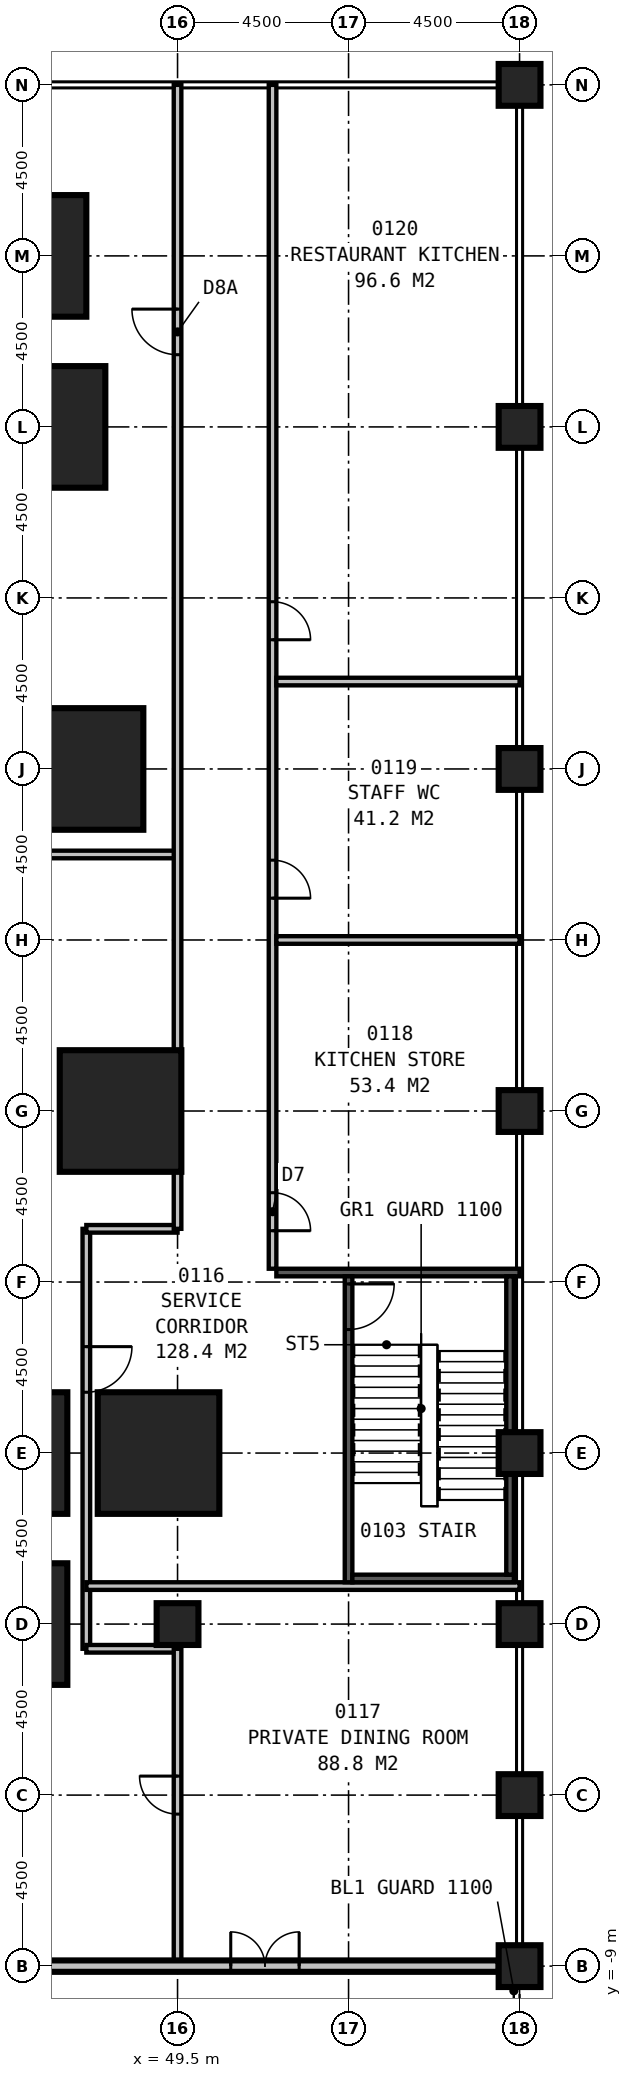
"""IFC4 building model, lengths in metres.
Left out: names, types, materials, properties, quantities, classifications, styles, units other than length and angle.
Written with IfcOpenShell. Run it as: python <this file> out.ifc"""

import sys

from ifc_helpers import new_model, si_unit, direction, frame, frame_2d, origin, origin_2d, place, context, subcontext, project, spatial, rectangle, extrude, element, fill, save


model = new_model("IFC4")
c1 = context("Model", 3, precision=1e-05, world=origin(), true_north=direction((0.0, 1.0)))
c2 = subcontext(c1, "Body", "Model", "MODEL_VIEW")
j1 = project(units=[si_unit("LENGTHUNIT", "METRE"), si_unit("PLANEANGLEUNIT", "RADIAN")], contexts=[c1])
p1 = place(None, origin())
s1 = spatial("IfcSite", under=j1, at=p1, CompositionType="ELEMENT")
p2 = place(p1, origin())
s2 = spatial("IfcBuilding", under=s1, at=p2, CompositionType="ELEMENT")
p3 = place(p2, frame((0.0, 0.0, 6.0)))
s3 = spatial("IfcBuildingStorey", under=s2, at=p3, CompositionType="ELEMENT", Elevation=6.0)
for number, where, z_axis, x_axis in (
    (1, (45.0, 0.0, 0.0), (0.0, 0.0, 1.0), (1.0, 0.0, 0.0)),
    (2, (45.0, 4.5, 0.0), (0.0, 0.0, 1.0), (1.0, 0.0, 0.0)),
    (3, (49.0, 4.5, 0.0), (0.0, 0.0, 1.0), (1.0, 0.0, 0.0)),
    (4, (48.0, 13.5, 0.0), (0.0, 0.0, 1.0), (1.0, 0.0, 0.0)),
    (5, (47.0, 22.5, 0.0), (0.0, 0.0, 1.0), (1.0, 0.0, 0.0)),
    (6, (46.0, 31.5, 0.0), (0.0, 0.0, 1.0), (1.0, 0.0, 0.0)),
    (7, (45.5, 36.0, 0.0), (0.0, 0.0, 1.0), (1.0, 0.0, 0.0)),
):
    element("IfcColumn", number, at=place(p3, frame(where, z_axis=z_axis, x_axis=x_axis)), inside=s3, PredefinedType="COLUMN", context=c2, shape_type="SweptSolid", body=[
        extrude(rectangle(XDim=3.2, YDim=3.2, at=origin_2d()), origin(), (0.0, 0.0, 1.0), 5.0),
    ])
for number, where, z_axis, x_axis in (
    (8, (58.5, -4.5, 0.0), (0.0, 0.0, 1.0), (1.0, 0.0, 0.0)),
    (9, (58.5, 4.5, 0.0), (0.0, 0.0, 1.0), (1.0, 0.0, 0.0)),
    (10, (58.5, 13.5, 0.0), (0.0, 0.0, 1.0), (1.0, 0.0, 0.0)),
    (11, (58.5, 22.5, 0.0), (0.0, 0.0, 1.0), (1.0, 0.0, 0.0)),
    (12, (58.5, 31.5, 0.0), (0.0, 0.0, 1.0), (1.0, 0.0, 0.0)),
    (13, (58.5, 40.5, 0.0), (0.0, 0.0, 1.0), (1.0, 0.0, 0.0)),
    (14, (58.5, 0.0, 0.0), (0.0, 0.0, 1.0), (1.0, 0.0, 0.0)),
    (15, (58.5, -9.0, 0.0), (0.0, 0.0, 1.0), (1.0, 0.0, 0.0)),
    (16, (49.5, 0.0, 0.0), (0.0, 0.0, 1.0), (1.0, 0.0, 0.0)),
):
    element("IfcColumn", number, at=place(p3, frame(where, z_axis=z_axis, x_axis=x_axis)), inside=s3, PredefinedType="COLUMN", context=c2, shape_type="SweptSolid", body=[
        extrude(rectangle(XDim=1.1, YDim=1.1, at=origin_2d()), origin(), (0.0, 0.0, 1.0), 5.0),
    ])
p4 = place(p3, frame((45.65, -9.0, 0.0), z_axis=(0.0, 0.0, 1.0), x_axis=(1.0, 0.0, 0.0)))
e17 = element("IfcWall", 17, at=p4, inside=s3, PredefinedType="STANDARD", context=c2, shape_type="SweptSolid", body=[
    extrude(rectangle(XDim=12.3, YDim=0.3, at=frame_2d((6.15, 0.0))), origin(), (0.0, 0.0, 1.0), 3.0),
])
p5 = place(p4, frame((5.25, 0.0, 0.0)))
e18 = element("IfcOpeningElement", 18, at=p5, cuts=e17, PredefinedType="OPENING", context=c2, shape_type="SweptSolid", body=[
    extrude(rectangle(XDim=1.8, YDim=2.4, at=frame_2d((0.9, 1.2))), frame((0.0, 0.16, 0.0), z_axis=(0.0, -1.0, 0.0), x_axis=(1.0, 0.0, 0.0)), (0.0, 0.0, 1.0), 0.32),
])
p6 = place(p3, frame((54.0, 1.1, 0.0), z_axis=(0.0, 0.0, 1.0), x_axis=(0.0, 1.0, 0.0)))
e19 = element("IfcWall", 19, at=p6, inside=s3, PredefinedType="SOLIDWALL", context=c2, shape_type="SweptSolid", body=[
    extrude(rectangle(XDim=8.05, YDim=0.2, at=frame_2d((4.025, 0.0))), origin(), (0.0, 0.0, 1.0), 4.7),
])
p7 = place(p6, frame((7.85, 0.0, 0.0), z_axis=(0.0, 0.0, 1.0), x_axis=(-1.0, 0.0, 0.0)))
e20 = element("IfcOpeningElement", 20, at=p7, cuts=e19, PredefinedType="OPENING", context=c2, shape_type="SweptSolid", body=[
    extrude(rectangle(XDim=1.2, YDim=2.1, at=frame_2d((0.6, 1.05))), frame((0.0, 0.11, 0.0), z_axis=(0.0, -1.0, 0.0), x_axis=(1.0, 0.0, 0.0)), (0.0, 0.0, 1.0), 0.22),
])
p8 = place(p3, frame((52.1, 9.25, 0.0), z_axis=(0.0, 0.0, 1.0), x_axis=(1.0, 0.0, 0.0)))
e21 = element("IfcWall", 21, at=p8, inside=s3, PredefinedType="SOLIDWALL", context=c2, shape_type="SweptSolid", body=[
    extrude(rectangle(XDim=6.4, YDim=0.2, at=frame_2d((3.2, 0.0))), origin(), (0.0, 0.0, 1.0), 4.7),
])
p9 = place(p3, frame((54.1, 1.2, 0.0), z_axis=(0.0, 0.0, 1.0), x_axis=(1.0, 0.0, 0.0)))
e22 = element("IfcWall", 22, at=p9, inside=s3, PredefinedType="SOLIDWALL", context=c2, shape_type="SweptSolid", body=[
    extrude(rectangle(XDim=4.25, YDim=0.2, at=frame_2d((2.125, 0.0))), origin(), (0.0, 0.0, 1.0), 4.7),
])
p10 = place(p3, frame((58.25, 1.3, 0.0), z_axis=(0.0, 0.0, 1.0), x_axis=(0.0, 1.0, 0.0)))
e23 = element("IfcWall", 23, at=p10, inside=s3, PredefinedType="SOLIDWALL", context=c2, shape_type="SweptSolid", body=[
    extrude(rectangle(XDim=2.65, YDim=0.2, at=frame_2d((1.325, 0.0))), origin(), (0.0, 0.0, 1.0), 4.7),
])
p11 = place(p3, frame((58.25, 5.05, 0.0), z_axis=(0.0, 0.0, 1.0), x_axis=(0.0, 1.0, 0.0)))
e24 = element("IfcWall", 24, at=p11, inside=s3, PredefinedType="SOLIDWALL", context=c2, shape_type="SweptSolid", body=[
    extrude(rectangle(XDim=4.1, YDim=0.2, at=frame_2d((2.05, 0.0))), origin(), (0.0, 0.0, 1.0), 4.7),
])
p12 = place(p3, frame((49.5, -9.0, 0.0), z_axis=(0.0, 0.0, 1.0), x_axis=(0.0, 1.0, 0.0)))
e25 = element("IfcWall", 25, at=p12, inside=s3, PredefinedType="PARTITIONING", context=c2, shape_type="SweptSolid", body=[
    extrude(rectangle(XDim=8.35, YDim=0.2, at=frame_2d((4.175, 0.0))), origin(), (0.0, 0.0, 1.0), 4.7),
])
p13 = place(p12, frame((4.0, 0.0, 0.0)))
e26 = element("IfcOpeningElement", 26, at=p13, cuts=e25, PredefinedType="OPENING", context=c2, shape_type="SweptSolid", body=[
    extrude(rectangle(XDim=1.0, YDim=2.1, at=frame_2d((0.5, 1.05))), frame((0.0, 0.11, 0.0), z_axis=(0.0, -1.0, 0.0), x_axis=(1.0, 0.0, 0.0)), (0.0, 0.0, 1.0), 0.22),
])
p14 = place(p3, frame((47.1, -0.65, 0.0), z_axis=(0.0, 0.0, 1.0), x_axis=(1.0, 0.0, 0.0)))
e27 = element("IfcWall", 27, at=p14, inside=s3, PredefinedType="PARTITIONING", context=c2, shape_type="SweptSolid", body=[
    extrude(rectangle(XDim=2.4, YDim=0.2, at=frame_2d((1.2, 0.0))), origin(), (0.0, 0.0, 1.0), 3.8),
])
p15 = place(p3, frame((47.1, -0.65, 0.0), z_axis=(0.0, 0.0, 1.0), x_axis=(0.0, 1.0, 0.0)))
e28 = element("IfcWall", 28, at=p15, inside=s3, PredefinedType="PARTITIONING", context=c2, shape_type="SweptSolid", body=[
    extrude(rectangle(XDim=11.05, YDim=0.2, at=frame_2d((5.525, 0.0))), origin(), (0.0, 0.0, 1.0), 4.7),
])
p16 = place(p15, frame((7.95, 0.0, 0.0), z_axis=(0.0, 0.0, 1.0), x_axis=(-1.0, 0.0, 0.0)))
e29 = element("IfcOpeningElement", 29, at=p16, cuts=e28, PredefinedType="OPENING", context=c2, shape_type="SweptSolid", body=[
    extrude(rectangle(XDim=1.2, YDim=2.1, at=frame_2d((0.6, 1.05))), frame((0.0, 0.11, 0.0), z_axis=(0.0, -1.0, 0.0), x_axis=(1.0, 0.0, 0.0)), (0.0, 0.0, 1.0), 0.22),
])
p17 = place(p3, frame((47.1, 10.4, 0.0), z_axis=(0.0, 0.0, 1.0), x_axis=(1.0, 0.0, 0.0)))
e30 = element("IfcWall", 30, at=p17, inside=s3, PredefinedType="PARTITIONING", context=c2, shape_type="SweptSolid", body=[
    extrude(rectangle(XDim=2.4, YDim=0.2, at=frame_2d((1.2, 0.0))), origin(), (0.0, 0.0, 1.0), 4.7),
])
p18 = place(p3, frame((49.5, 10.4, 0.0), z_axis=(0.0, 0.0, 1.0), x_axis=(0.0, 1.0, 0.0)))
e31 = element("IfcWall", 31, at=p18, inside=s3, PredefinedType="PARTITIONING", context=c2, shape_type="SweptSolid", body=[
    extrude(rectangle(XDim=30.1, YDim=0.2, at=frame_2d((15.05, 0.0))), origin(), (0.0, 0.0, 1.0), 4.7),
])
p19 = place(p18, frame((23.0, 0.0, 0.0)))
e32 = element("IfcOpeningElement", 32, at=p19, cuts=e31, PredefinedType="OPENING", context=c2, shape_type="SweptSolid", body=[
    extrude(rectangle(XDim=1.2, YDim=2.1, at=frame_2d((0.6, 1.05))), frame((0.0, 0.11, 0.0), z_axis=(0.0, -1.0, 0.0), x_axis=(1.0, 0.0, 0.0)), (0.0, 0.0, 1.0), 0.22),
])
p20 = place(p3, frame((36.3, 20.25, 0.0), z_axis=(0.0, 0.0, 1.0), x_axis=(1.0, 0.0, 0.0)))
e33 = element("IfcWall", 33, at=p20, inside=s3, PredefinedType="PARTITIONING", context=c2, shape_type="SweptSolid", body=[
    extrude(rectangle(XDim=13.2, YDim=0.2, at=frame_2d((6.6, 0.0))), origin(), (0.0, 0.0, 1.0), 4.7),
])
p21 = place(p20, frame((4.0, 0.0, 0.0)))
e34 = element("IfcOpeningElement", 34, at=p21, cuts=e33, PredefinedType="OPENING", context=c2, shape_type="SweptSolid", body=[
    extrude(rectangle(XDim=1.8, YDim=2.4, at=frame_2d((0.9, 1.2))), frame((0.0, 0.11, 0.0), z_axis=(0.0, -1.0, 0.0), x_axis=(1.0, 0.0, 0.0)), (0.0, 0.0, 1.0), 0.22),
])
p22 = place(p3, frame((52.0, 9.35, 0.0), z_axis=(0.0, 0.0, 1.0), x_axis=(0.0, 1.0, 0.0)))
e35 = element("IfcWall", 35, at=p22, inside=s3, PredefinedType="PARTITIONING", context=c2, shape_type="SweptSolid", body=[
    extrude(rectangle(XDim=31.15, YDim=0.2, at=frame_2d((15.575, 0.0))), origin(), (0.0, 0.0, 1.0), 4.7),
])
p23 = place(p22, frame((2.0, 0.0, 0.0), z_axis=(0.0, 0.0, 1.0), x_axis=(-1.0, 0.0, 0.0)))
e36 = element("IfcOpeningElement", 36, at=p23, cuts=e35, PredefinedType="OPENING", context=c2, shape_type="SweptSolid", body=[
    extrude(rectangle(XDim=1.0, YDim=2.1, at=frame_2d((0.5, 1.05))), frame((0.0, 0.11, 0.0), z_axis=(0.0, -1.0, 0.0), x_axis=(1.0, 0.0, 0.0)), (0.0, 0.0, 1.0), 0.22),
])
p24 = place(p22, frame((10.75, 0.0, 0.0), z_axis=(0.0, 0.0, 1.0), x_axis=(-1.0, 0.0, 0.0)))
e37 = element("IfcOpeningElement", 37, at=p24, cuts=e35, PredefinedType="OPENING", context=c2, shape_type="SweptSolid", body=[
    extrude(rectangle(XDim=1.0, YDim=2.1, at=frame_2d((0.5, 1.05))), frame((0.0, 0.11, 0.0), z_axis=(0.0, -1.0, 0.0), x_axis=(1.0, 0.0, 0.0)), (0.0, 0.0, 1.0), 0.22),
])
p25 = place(p22, frame((17.55, 0.0, 0.0), z_axis=(0.0, 0.0, 1.0), x_axis=(-1.0, 0.0, 0.0)))
e38 = element("IfcOpeningElement", 38, at=p25, cuts=e35, PredefinedType="OPENING", context=c2, shape_type="SweptSolid", body=[
    extrude(rectangle(XDim=1.0, YDim=2.1, at=frame_2d((0.5, 1.05))), frame((0.0, 0.11, 0.0), z_axis=(0.0, -1.0, 0.0), x_axis=(1.0, 0.0, 0.0)), (0.0, 0.0, 1.0), 0.22),
])
p26 = place(p3, frame((47.1, 1.0, 0.0), z_axis=(0.0, 0.0, 1.0), x_axis=(1.0, 0.0, 0.0)))
e39 = element("IfcWall", 39, at=p26, inside=s3, PredefinedType="PARTITIONING", context=c2, shape_type="SweptSolid", body=[
    extrude(rectangle(XDim=11.4, YDim=0.2, at=frame_2d((5.7, 0.0))), origin(), (0.0, 0.0, 1.0), 3.8),
])
for number, where, z_axis, x_axis in (
    (40, (52.1, 18.0, 0.0), (0.0, 0.0, 1.0), (1.0, 0.0, 0.0)),
    (41, (52.1, 24.8, 0.0), (0.0, 0.0, 1.0), (1.0, 0.0, 0.0)),
):
    element("IfcWall", number, at=place(p3, frame(where, z_axis=z_axis, x_axis=x_axis)), inside=s3, PredefinedType="PARTITIONING", context=c2, shape_type="SweptSolid", body=[
        extrude(rectangle(XDim=6.4, YDim=0.2, at=frame_2d((3.2, 0.0))), origin(), (0.0, 0.0, 1.0), 4.7),
    ])
p27 = place(p5, origin())
e42 = element("IfcDoor", 42, at=p27, inside=s3, OperationType="DOUBLE_DOOR_SINGLE_SWING", PredefinedType="DOOR", context=c2, shape_type="SweptSolid", body=[
    extrude(rectangle(XDim=1.8, YDim=2.4, at=frame_2d((0.9, 1.2))), frame((0.0, 0.025, 0.0), z_axis=(0.0, -1.0, 0.0), x_axis=(1.0, 0.0, 0.0)), (0.0, 0.0, 1.0), 0.05),
])
fill(e18, e42)
p28 = place(p7, origin())
e43 = element("IfcDoor", 43, at=p28, inside=s3, OperationType="SINGLE_SWING_LEFT", PredefinedType="DOOR", context=c2, shape_type="SweptSolid", body=[
    extrude(rectangle(XDim=1.2, YDim=2.1, at=frame_2d((0.6, 1.05))), frame((0.0, 0.025, 0.0), z_axis=(0.0, -1.0, 0.0), x_axis=(1.0, 0.0, 0.0)), (0.0, 0.0, 1.0), 0.05),
])
fill(e20, e43)
p29 = place(p13, origin())
e44 = element("IfcDoor", 44, at=p29, inside=s3, OperationType="SINGLE_SWING_RIGHT", PredefinedType="DOOR", context=c2, shape_type="SweptSolid", body=[
    extrude(rectangle(XDim=1.0, YDim=2.1, at=frame_2d((0.5, 1.05))), frame((0.0, 0.025, 0.0), z_axis=(0.0, -1.0, 0.0), x_axis=(1.0, 0.0, 0.0)), (0.0, 0.0, 1.0), 0.05),
])
fill(e26, e44)
p30 = place(p16, origin())
e45 = element("IfcDoor", 45, at=p30, inside=s3, OperationType="SINGLE_SWING_LEFT", PredefinedType="DOOR", context=c2, shape_type="SweptSolid", body=[
    extrude(rectangle(XDim=1.2, YDim=2.1, at=frame_2d((0.6, 1.05))), frame((0.0, 0.025, 0.0), z_axis=(0.0, -1.0, 0.0), x_axis=(1.0, 0.0, 0.0)), (0.0, 0.0, 1.0), 0.05),
])
fill(e29, e45)
p31 = place(p19, origin())
e46 = element("IfcDoor", 46, at=p31, inside=s3, OperationType="SINGLE_SWING_RIGHT", PredefinedType="DOOR", context=c2, shape_type="SweptSolid", body=[
    extrude(rectangle(XDim=1.2, YDim=2.1, at=frame_2d((0.6, 1.05))), frame((0.0, 0.025, 0.0), z_axis=(0.0, -1.0, 0.0), x_axis=(1.0, 0.0, 0.0)), (0.0, 0.0, 1.0), 0.05),
])
fill(e32, e46)
p32 = place(p23, origin())
e47 = element("IfcDoor", 47, at=p32, inside=s3, OperationType="SINGLE_SWING_RIGHT", PredefinedType="DOOR", context=c2, shape_type="SweptSolid", body=[
    extrude(rectangle(XDim=1.0, YDim=2.1, at=frame_2d((0.5, 1.05))), frame((0.0, 0.025, 0.0), z_axis=(0.0, -1.0, 0.0), x_axis=(1.0, 0.0, 0.0)), (0.0, 0.0, 1.0), 0.05),
])
fill(e36, e47)
p33 = place(p24, origin())
e48 = element("IfcDoor", 48, at=p33, inside=s3, OperationType="SINGLE_SWING_RIGHT", PredefinedType="DOOR", context=c2, shape_type="SweptSolid", body=[
    extrude(rectangle(XDim=1.0, YDim=2.1, at=frame_2d((0.5, 1.05))), frame((0.0, 0.025, 0.0), z_axis=(0.0, -1.0, 0.0), x_axis=(1.0, 0.0, 0.0)), (0.0, 0.0, 1.0), 0.05),
])
fill(e37, e48)
p34 = place(p25, origin())
e49 = element("IfcDoor", 49, at=p34, inside=s3, OperationType="SINGLE_SWING_RIGHT", PredefinedType="DOOR", context=c2, shape_type="SweptSolid", body=[
    extrude(rectangle(XDim=1.0, YDim=2.1, at=frame_2d((0.5, 1.05))), frame((0.0, 0.025, 0.0), z_axis=(0.0, -1.0, 0.0), x_axis=(1.0, 0.0, 0.0)), (0.0, 0.0, 1.0), 0.05),
])
fill(e38, e49)
save(model, sys.argv[1])
